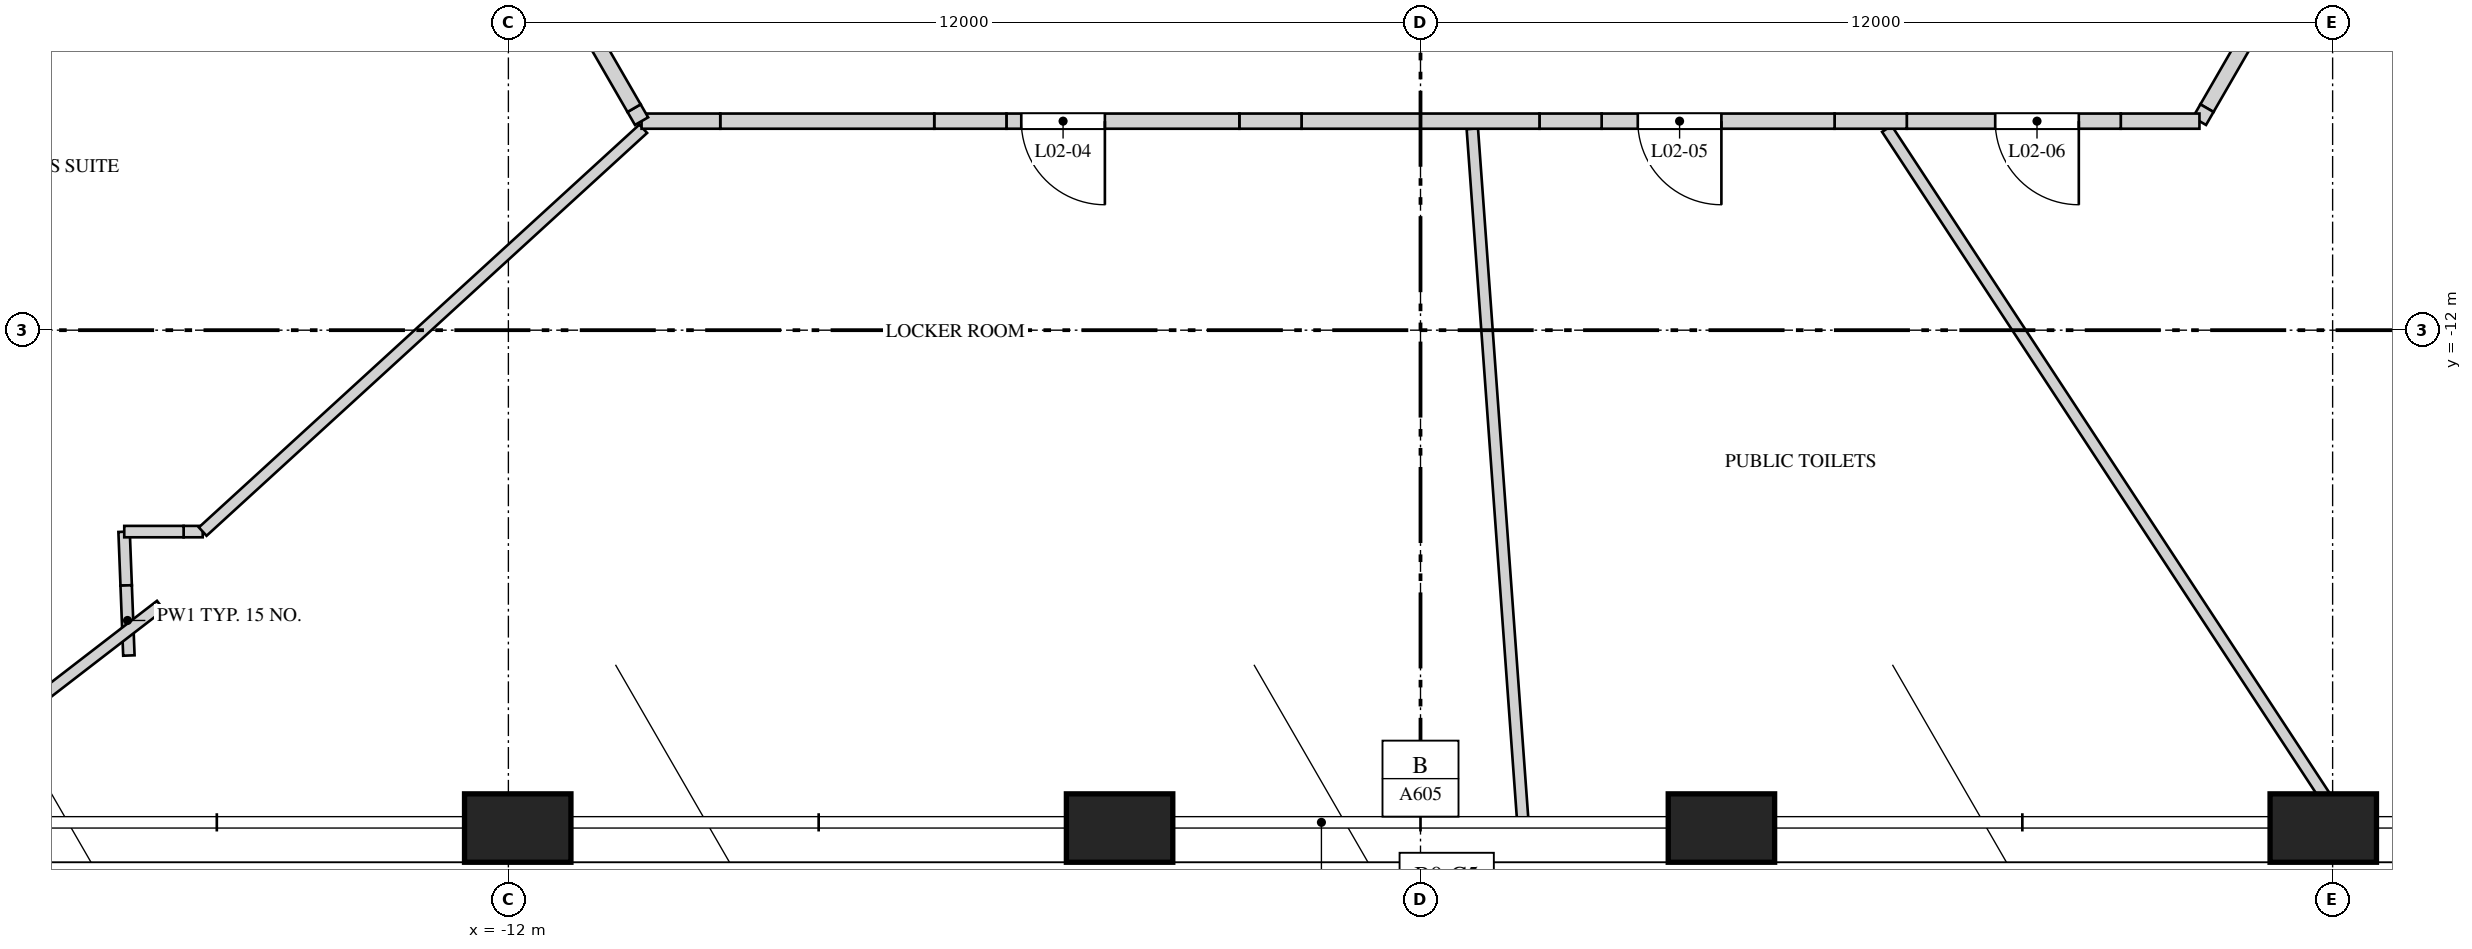
"""IFC4 building model, lengths in metres.
Left out: names, types, materials, properties, quantities, classifications, styles, units other than length and angle.
Written with IfcOpenShell. Run it as: python <this file> out.ifc"""

import sys

from ifc_helpers import new_model, si_unit, direction, frame, frame_2d, origin, origin_2d, place, context, subcontext, project, spatial, rectangle, extrude, element, fill, save


model = new_model("IFC4")
c1 = context("Model", 3, precision=1e-05, world=origin(), true_north=direction((0.0, 1.0)))
c2 = subcontext(c1, "Body", "Model", "MODEL_VIEW")
j1 = project(units=[si_unit("LENGTHUNIT", "METRE"), si_unit("PLANEANGLEUNIT", "RADIAN")], contexts=[c1])
p1 = place(None, origin())
s1 = spatial("IfcSite", under=j1, at=p1, CompositionType="ELEMENT")
p2 = place(p1, origin())
s2 = spatial("IfcBuilding", under=s1, at=p2, CompositionType="ELEMENT")
p3 = place(p2, frame((0.0, 0.0, 15.0)))
s3 = spatial("IfcBuildingStorey", under=s2, at=p3, CompositionType="ELEMENT", Elevation=15.0)
for number, where, z_axis, x_axis in (
    (1, (-11.877, -18.55, 0.0), (0.0, 0.0, 1.0), (1.0, 0.0, 0.0)),
    (2, (-3.959, -18.55, 0.0), (0.0, 0.0, 1.0), (1.0, 0.0, 0.0)),
    (3, (3.959, -18.55, 0.0), (0.0, 0.0, 1.0), (1.0, 0.0, 0.0)),
    (4, (11.877, -18.55, 0.0), (0.0, 0.0, 1.0), (1.0, 0.0, 0.0)),
):
    element("IfcColumn", number, at=place(p3, frame(where, z_axis=z_axis, x_axis=x_axis)), inside=s3, PredefinedType="COLUMN", context=c2, shape_type="SweptSolid", body=[
        extrude(rectangle(XDim=1.4, YDim=0.9, at=origin_2d()), origin(), (0.0, 0.0, 1.0), 5.0),
    ])
p4 = place(p3, frame((-17.056, -14.652, 0.0), z_axis=(0.0, 0.0, 1.0), x_axis=(0.038353502747, -0.999264233738, 0.0)))
e5 = element("IfcWall", 5, at=p4, inside=s3, PredefinedType="PARTITIONING", context=c2, shape_type="SweptSolid", body=[
    extrude(rectangle(XDim=0.707, YDim=0.15, at=frame_2d((0.353, 0.0))), origin(), (0.0, 0.0, 1.0), 4.65),
])
p5 = place(p3, frame((-17.029, -15.358, 0.0), z_axis=(0.0, 0.0, 1.0), x_axis=(0.038890334198, -0.999243484795, 0.0)))
e6 = element("IfcWall", 6, at=p5, inside=s3, PredefinedType="PARTITIONING", context=c2, shape_type="SweptSolid", body=[
    extrude(rectangle(XDim=0.923, YDim=0.15, at=frame_2d((0.461, 0.0))), origin(), (0.0, 0.0, 1.0), 3.55),
])
p6 = place(p3, frame((-16.577, -15.62, 0.0), z_axis=(0.0, 0.0, 1.0), x_axis=(-0.79203798149, -0.610471814155, 0.0)))
e7 = element("IfcWall", 7, at=p6, inside=s3, PredefinedType="PARTITIONING", context=c2, shape_type="SweptSolid", body=[
    extrude(rectangle(XDim=4.603, YDim=0.15, at=frame_2d((2.301, 0.0))), origin(), (0.0, 0.0, 1.0), 3.55),
])
p7 = place(p3, frame((-16.022, -14.65, 0.0), z_axis=(0.0, 0.0, 1.0), x_axis=(-1.0, 0.0, 0.0)))
e8 = element("IfcWall", 8, at=p7, inside=s3, PredefinedType="PARTITIONING", context=c2, shape_type="SweptSolid", body=[
    extrude(rectangle(XDim=0.251, YDim=0.15, at=frame_2d((0.125, 0.0))), origin(), (0.0, 0.0, 1.0), 3.55),
])
p8 = place(p3, frame((-16.273, -14.65, 0.0), z_axis=(0.0, 0.0, 1.0), x_axis=(-1.0, 0.0, 0.0)))
e9 = element("IfcWall", 9, at=p8, inside=s3, PredefinedType="PARTITIONING", context=c2, shape_type="SweptSolid", body=[
    extrude(rectangle(XDim=0.781, YDim=0.15, at=frame_2d((0.391, 0.0))), origin(), (0.0, 0.0, 1.0), 4.65),
])
p9 = place(p3, frame((-10.226, -9.35, 0.0), z_axis=(0.0, 0.0, 1.0), x_axis=(-0.738000060557, -0.674800645093, 0.0)))
e10 = element("IfcWall", 10, at=p9, inside=s3, PredefinedType="PARTITIONING", context=c2, shape_type="SweptSolid", body=[
    extrude(rectangle(XDim=7.854, YDim=0.15, at=frame_2d((3.927, 0.0))), origin(), (0.0, 0.0, 1.0), 3.55),
])
p10 = place(p3, frame((0.682, -9.35, 0.0), z_axis=(0.0, 0.0, 1.0), x_axis=(0.072727761096, -0.997351829981, 0.0)))
e11 = element("IfcWall", 11, at=p10, inside=s3, PredefinedType="PARTITIONING", context=c2, shape_type="SweptSolid", body=[
    extrude(rectangle(XDim=9.104, YDim=0.15, at=frame_2d((4.552, 0.0))), origin(), (0.0, 0.0, 1.0), 4.65),
])
p11 = place(p3, frame((6.135, -9.35, 0.0), z_axis=(0.0, 0.0, 1.0), x_axis=(0.548631398355, -0.836064344856, 0.0)))
e12 = element("IfcWall", 12, at=p11, inside=s3, PredefinedType="PARTITIONING", context=c2, shape_type="SweptSolid", body=[
    extrude(rectangle(XDim=10.86, YDim=0.15, at=frame_2d((5.43, 0.0))), origin(), (0.0, 0.0, 1.0), 3.75),
])
p12 = place(p3, frame((12.152, -6.152, 0.0), z_axis=(0.0, 0.0, 1.0), x_axis=(0.892189195248, -0.451661864542, 0.0)))
e13 = element("IfcWall", 13, at=p12, inside=s3, PredefinedType="PARTITIONING", context=c2, shape_type="SweptSolid", body=[
    extrude(rectangle(XDim=12.323, YDim=0.15, at=frame_2d((6.161, 0.0))), origin(), (0.0, 0.0, 1.0), 3.55),
])
p13 = place(p3, frame((10.98, -7.982, 0.0), z_axis=(0.0, 0.0, 1.0), x_axis=(-0.499911523785, -0.866076479525, 0.0)))
e14 = element("IfcWall", 14, at=p13, inside=s3, PredefinedType="SOLIDWALL", context=c2, shape_type="SweptSolid", body=[
    extrude(rectangle(XDim=1.267, YDim=0.2, at=frame_2d((0.633, 0.0))), origin(), (0.0, 0.0, 1.0), 4.65),
])
p14 = place(p3, frame((10.347, -9.079, 0.0), z_axis=(0.0, 0.0, 1.0), x_axis=(-0.499865263774, -0.866103179807, 0.0)))
e15 = element("IfcWall", 15, at=p14, inside=s3, PredefinedType="SOLIDWALL", context=c2, shape_type="SweptSolid", body=[
    extrude(rectangle(XDim=0.197, YDim=0.2, at=frame_2d((0.099, 0.0))), origin(), (0.0, 0.0, 1.0), 3.55),
])
p15 = place(p3, frame((10.248, -9.25, 0.0), z_axis=(0.0, 0.0, 1.0), x_axis=(-1.0, 0.0, 0.0)))
e16 = element("IfcWall", 16, at=p15, inside=s3, PredefinedType="SOLIDWALL", context=c2, shape_type="SweptSolid", body=[
    extrude(rectangle(XDim=1.035, YDim=0.2, at=frame_2d((0.518, 0.0))), origin(), (0.0, 0.0, 1.0), 3.55),
])
p16 = place(p3, frame((9.213, -9.25, 0.0), z_axis=(0.0, 0.0, 1.0), x_axis=(-1.0, 0.0, 0.0)))
e17 = element("IfcWall", 17, at=p16, inside=s3, PredefinedType="SOLIDWALL", context=c2, shape_type="SweptSolid", body=[
    extrude(rectangle(XDim=2.815, YDim=0.2, at=frame_2d((1.408, 0.0))), origin(), (0.0, 0.0, 1.0), 4.65),
])
p17 = place(p16, frame((0.552, 0.0, 0.0)))
e18 = element("IfcOpeningElement", 18, at=p17, cuts=e17, PredefinedType="OPENING", context=c2, shape_type="SweptSolid", body=[
    extrude(rectangle(XDim=1.1, YDim=2.4, at=frame_2d((0.55, 1.2))), frame((0.0, 0.11, 0.0), z_axis=(0.0, -1.0, 0.0), x_axis=(1.0, 0.0, 0.0)), (0.0, 0.0, 1.0), 0.22),
])
p18 = place(p3, frame((6.397, -9.25, 0.0), z_axis=(0.0, 0.0, 1.0), x_axis=(-1.0, 0.0, 0.0)))
e19 = element("IfcWall", 19, at=p18, inside=s3, PredefinedType="SOLIDWALL", context=c2, shape_type="SweptSolid", body=[
    extrude(rectangle(XDim=0.95, YDim=0.2, at=frame_2d((0.475, 0.0))), origin(), (0.0, 0.0, 1.0), 3.75),
])
p19 = place(p3, frame((5.448, -9.25, 0.0), z_axis=(0.0, 0.0, 1.0), x_axis=(-1.0, 0.0, 0.0)))
e20 = element("IfcWall", 20, at=p19, inside=s3, PredefinedType="SOLIDWALL", context=c2, shape_type="SweptSolid", body=[
    extrude(rectangle(XDim=3.064, YDim=0.2, at=frame_2d((1.532, 0.0))), origin(), (0.0, 0.0, 1.0), 4.65),
])
p20 = place(p19, frame((1.489, 0.0, 0.0)))
e21 = element("IfcOpeningElement", 21, at=p20, cuts=e20, PredefinedType="OPENING", context=c2, shape_type="SweptSolid", body=[
    extrude(rectangle(XDim=1.1, YDim=2.4, at=frame_2d((0.55, 1.2))), frame((0.0, 0.11, 0.0), z_axis=(0.0, -1.0, 0.0), x_axis=(1.0, 0.0, 0.0)), (0.0, 0.0, 1.0), 0.22),
])
p21 = place(p3, frame((2.383, -9.25, 0.0), z_axis=(0.0, 0.0, 1.0), x_axis=(-1.0, 0.0, 0.0)))
e22 = element("IfcWall", 22, at=p21, inside=s3, PredefinedType="SOLIDWALL", context=c2, shape_type="SweptSolid", body=[
    extrude(rectangle(XDim=0.818, YDim=0.2, at=frame_2d((0.409, 0.0))), origin(), (0.0, 0.0, 1.0), 3.75),
])
p22 = place(p3, frame((1.565, -9.25, 0.0), z_axis=(0.0, 0.0, 1.0), x_axis=(-1.0, 0.0, 0.0)))
e23 = element("IfcWall", 23, at=p22, inside=s3, PredefinedType="SOLIDWALL", context=c2, shape_type="SweptSolid", body=[
    extrude(rectangle(XDim=3.13, YDim=0.2, at=frame_2d((1.565, 0.0))), origin(), (0.0, 0.0, 1.0), 4.65),
])
p23 = place(p3, frame((-1.565, -9.25, 0.0), z_axis=(0.0, 0.0, 1.0), x_axis=(-1.0, 0.0, 0.0)))
e24 = element("IfcWall", 24, at=p23, inside=s3, PredefinedType="SOLIDWALL", context=c2, shape_type="SweptSolid", body=[
    extrude(rectangle(XDim=0.818, YDim=0.2, at=frame_2d((0.409, 0.0))), origin(), (0.0, 0.0, 1.0), 3.75),
])
p24 = place(p3, frame((-2.383, -9.25, 0.0), z_axis=(0.0, 0.0, 1.0), x_axis=(-1.0, 0.0, 0.0)))
e25 = element("IfcWall", 25, at=p24, inside=s3, PredefinedType="SOLIDWALL", context=c2, shape_type="SweptSolid", body=[
    extrude(rectangle(XDim=3.064, YDim=0.2, at=frame_2d((1.532, 0.0))), origin(), (0.0, 0.0, 1.0), 4.65),
])
p25 = place(p24, frame((1.769, 0.0, 0.0)))
e26 = element("IfcOpeningElement", 26, at=p25, cuts=e25, PredefinedType="OPENING", context=c2, shape_type="SweptSolid", body=[
    extrude(rectangle(XDim=1.1, YDim=2.4, at=frame_2d((0.55, 1.2))), frame((0.0, 0.11, 0.0), z_axis=(0.0, -1.0, 0.0), x_axis=(1.0, 0.0, 0.0)), (0.0, 0.0, 1.0), 0.22),
])
p26 = place(p3, frame((-5.448, -9.25, 0.0), z_axis=(0.0, 0.0, 1.0), x_axis=(-1.0, 0.0, 0.0)))
e27 = element("IfcWall", 27, at=p26, inside=s3, PredefinedType="SOLIDWALL", context=c2, shape_type="SweptSolid", body=[
    extrude(rectangle(XDim=0.95, YDim=0.2, at=frame_2d((0.475, 0.0))), origin(), (0.0, 0.0, 1.0), 3.75),
])
p27 = place(p3, frame((-6.397, -9.25, 0.0), z_axis=(0.0, 0.0, 1.0), x_axis=(-1.0, 0.0, 0.0)))
e28 = element("IfcWall", 28, at=p27, inside=s3, PredefinedType="SOLIDWALL", context=c2, shape_type="SweptSolid", body=[
    extrude(rectangle(XDim=2.815, YDim=0.2, at=frame_2d((1.408, 0.0))), origin(), (0.0, 0.0, 1.0), 4.65),
])
p28 = place(p3, frame((-9.213, -9.25, 0.0), z_axis=(0.0, 0.0, 1.0), x_axis=(-1.0, 0.0, 0.0)))
e29 = element("IfcWall", 29, at=p28, inside=s3, PredefinedType="SOLIDWALL", context=c2, shape_type="SweptSolid", body=[
    extrude(rectangle(XDim=1.035, YDim=0.2, at=frame_2d((0.518, 0.0))), origin(), (0.0, 0.0, 1.0), 3.55),
])
p29 = place(p3, frame((-10.248, -9.25, 0.0), z_axis=(0.0, 0.0, 1.0), x_axis=(-0.499865263774, 0.866103179807, 0.0)))
e30 = element("IfcWall", 30, at=p29, inside=s3, PredefinedType="SOLIDWALL", context=c2, shape_type="SweptSolid", body=[
    extrude(rectangle(XDim=0.197, YDim=0.2, at=frame_2d((0.099, 0.0))), origin(), (0.0, 0.0, 1.0), 3.55),
])
p30 = place(p3, frame((-10.347, -9.079, 0.0), z_axis=(0.0, 0.0, 1.0), x_axis=(-0.499911523785, 0.866076479525, 0.0)))
e31 = element("IfcWall", 31, at=p30, inside=s3, PredefinedType="SOLIDWALL", context=c2, shape_type="SweptSolid", body=[
    extrude(rectangle(XDim=1.267, YDim=0.2, at=frame_2d((0.633, 0.0))), origin(), (0.0, 0.0, 1.0), 4.65),
])
p31 = place(p25, origin())
e32 = element("IfcDoor", 32, at=p31, inside=s3, OperationType="SINGLE_SWING_RIGHT", PredefinedType="DOOR", context=c2, shape_type="SweptSolid", body=[
    extrude(rectangle(XDim=1.1, YDim=2.4, at=frame_2d((0.55, 1.2))), frame((0.0, 0.025, 0.0), z_axis=(0.0, -1.0, 0.0), x_axis=(1.0, 0.0, 0.0)), (0.0, 0.0, 1.0), 0.05),
])
fill(e26, e32)
p32 = place(p20, origin())
e33 = element("IfcDoor", 33, at=p32, inside=s3, OperationType="SINGLE_SWING_LEFT", PredefinedType="DOOR", context=c2, shape_type="SweptSolid", body=[
    extrude(rectangle(XDim=1.1, YDim=2.4, at=frame_2d((0.55, 1.2))), frame((0.0, 0.025, 0.0), z_axis=(0.0, -1.0, 0.0), x_axis=(1.0, 0.0, 0.0)), (0.0, 0.0, 1.0), 0.05),
])
fill(e21, e33)
p33 = place(p17, origin())
e34 = element("IfcDoor", 34, at=p33, inside=s3, OperationType="SINGLE_SWING_RIGHT", PredefinedType="DOOR", context=c2, shape_type="SweptSolid", body=[
    extrude(rectangle(XDim=1.1, YDim=2.4, at=frame_2d((0.55, 1.2))), frame((0.0, 0.025, 0.0), z_axis=(0.0, -1.0, 0.0), x_axis=(1.0, 0.0, 0.0)), (0.0, 0.0, 1.0), 0.05),
])
fill(e18, e34)
save(model, sys.argv[1])
